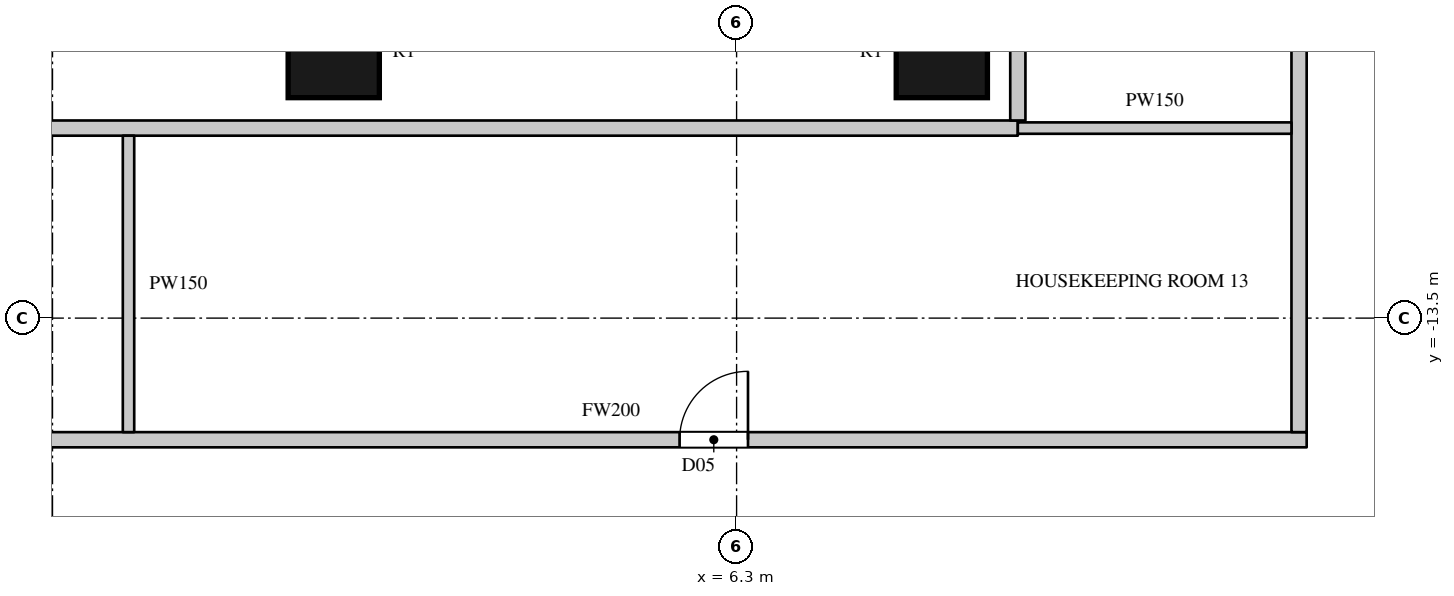
"""IFC4 building model, lengths in metres.
Left out: names, types, materials, properties, quantities, classifications, styles, units other than length and angle.
Written with IfcOpenShell. Run it as: python <this file> out.ifc"""

import sys

from ifc_helpers import new_model, si_unit, direction, frame, frame_2d, origin, origin_2d, place, context, subcontext, project, spatial, rectangle, circle, extrude, element, fill, save


model = new_model("IFC4")
c1 = context("Model", 3, precision=1e-05, world=origin(), true_north=direction((0.0, 1.0)))
c2 = subcontext(c1, "Body", "Model", "MODEL_VIEW")
j1 = project(units=[si_unit("LENGTHUNIT", "METRE"), si_unit("PLANEANGLEUNIT", "RADIAN")], contexts=[c1])
p1 = place(None, origin())
s1 = spatial("IfcSite", under=j1, at=p1, CompositionType="ELEMENT")
p2 = place(p1, origin())
s2 = spatial("IfcBuilding", under=s1, at=p2, CompositionType="ELEMENT")
p3 = place(p2, frame((0.0, 0.0, 77.1)))
s3 = spatial("IfcBuildingStorey", under=s2, at=p3, CompositionType="ELEMENT", Elevation=77.1)
for number, where, z_axis, x_axis in (
    (1, (1.0, -10.0, 0.0), (0.0, 0.0, 1.0), (1.0, 0.0, 0.0)),
    (2, (9.0, -10.0, 0.0), (0.0, 0.0, 1.0), (1.0, 0.0, 0.0)),
):
    element("IfcColumn", number, at=place(p3, frame(where, z_axis=z_axis, x_axis=x_axis)), inside=s3, PredefinedType="COLUMN", context=c2, shape_type="SweptSolid", body=[
        extrude(circle(Radius=0.6, at=origin_2d()), origin(), (0.0, 0.0, 1.0), 3.6),
    ])
p4 = place(p3, frame((-8.1, -11.0, 0.0), z_axis=(0.0, 0.0, 1.0), x_axis=(1.0, 0.0, 0.0)))
e3 = element("IfcWall", 3, at=p4, inside=s3, PredefinedType="PARTITIONING", context=c2, shape_type="SweptSolid", body=[
    extrude(rectangle(XDim=18.1, YDim=0.2, at=frame_2d((9.05, 0.0))), origin(), (0.0, 0.0, 1.0), 3.3),
])
p5 = place(p4, frame((1.7, 0.0, 0.0)))
e4 = element("IfcOpeningElement", 4, at=p5, cuts=e3, PredefinedType="OPENING", context=c2, shape_type="SweptSolid", body=[
    extrude(rectangle(XDim=1.5, YDim=2.2, at=frame_2d((0.75, 1.1))), frame((0.0, 0.11, 0.0), z_axis=(0.0, -1.0, 0.0), x_axis=(1.0, 0.0, 0.0)), (0.0, 0.0, 1.0), 0.22),
])
p6 = place(p3, frame((-4.5, -15.1, 0.0), z_axis=(0.0, 0.0, 1.0), x_axis=(1.0, 0.0, 0.0)))
e5 = element("IfcWall", 5, at=p6, inside=s3, PredefinedType="PARTITIONING", context=c2, shape_type="SweptSolid", body=[
    extrude(rectangle(XDim=18.3, YDim=0.2, at=frame_2d((9.15, 0.0))), origin(), (0.0, 0.0, 1.0), 3.3),
])
p7 = place(p6, frame((10.05, 0.0, 0.0)))
e6 = element("IfcOpeningElement", 6, at=p7, cuts=e5, PredefinedType="OPENING", context=c2, shape_type="SweptSolid", body=[
    extrude(rectangle(XDim=0.9, YDim=2.2, at=frame_2d((0.45, 1.1))), frame((0.0, 0.11, 0.0), z_axis=(0.0, -1.0, 0.0), x_axis=(1.0, 0.0, 0.0)), (0.0, 0.0, 1.0), 0.22),
])
p8 = place(p3, frame((10.0, -10.9, 0.0), z_axis=(0.0, 0.0, 1.0), x_axis=(0.0, 1.0, 0.0)))
e7 = element("IfcWall", 7, at=p8, inside=s3, PredefinedType="PARTITIONING", context=c2, shape_type="SweptSolid", body=[
    extrude(rectangle(XDim=21.8, YDim=0.2, at=frame_2d((10.9, 0.0))), origin(), (0.0, 0.0, 1.0), 3.3),
])
p9 = place(p8, frame((15.9, 0.0, 0.0)))
e8 = element("IfcOpeningElement", 8, at=p9, cuts=e7, PredefinedType="OPENING", context=c2, shape_type="SweptSolid", body=[
    extrude(rectangle(XDim=1.5, YDim=2.2, at=frame_2d((0.75, 1.1))), frame((0.0, 0.11, 0.0), z_axis=(0.0, -1.0, 0.0), x_axis=(1.0, 0.0, 0.0)), (0.0, 0.0, 1.0), 0.22),
])
p10 = place(p8, frame((8.75, 0.0, 0.0)))
e9 = element("IfcOpeningElement", 9, at=p10, cuts=e7, PredefinedType="OPENING", context=c2, shape_type="SweptSolid", body=[
    extrude(rectangle(XDim=1.5, YDim=2.2, at=frame_2d((0.75, 1.1))), frame((0.0, 0.11, 0.0), z_axis=(0.0, -1.0, 0.0), x_axis=(1.0, 0.0, 0.0)), (0.0, 0.0, 1.0), 0.22),
])
p11 = place(p3, frame((13.7, -15.0, 0.0), z_axis=(0.0, 0.0, 1.0), x_axis=(0.0, 1.0, 0.0)))
e10 = element("IfcWall", 10, at=p11, inside=s3, PredefinedType="PARTITIONING", context=c2, shape_type="SweptSolid", body=[
    extrude(rectangle(XDim=7.2, YDim=0.2, at=frame_2d((3.6, 0.0))), origin(), (0.0, 0.0, 1.0), 3.3),
])
p12 = place(p3, frame((-1.7, -15.0, 0.0), z_axis=(0.0, 0.0, 1.0), x_axis=(0.0, 1.0, 0.0)))
e11 = element("IfcWall", 11, at=p12, inside=s3, PredefinedType="PARTITIONING", context=c2, shape_type="SweptSolid", body=[
    extrude(rectangle(XDim=3.9, YDim=0.15, at=frame_2d((1.95, 0.0))), origin(), (0.0, 0.0, 1.0), 3.3),
])
p13 = place(p3, frame((10.0, -11.0, 0.0), z_axis=(0.0, 0.0, 1.0), x_axis=(1.0, 0.0, 0.0)))
e12 = element("IfcWall", 12, at=p13, inside=s3, PredefinedType="PARTITIONING", context=c2, shape_type="SweptSolid", body=[
    extrude(rectangle(XDim=3.6, YDim=0.15, at=frame_2d((1.8, 0.0))), origin(), (0.0, 0.0, 1.0), 3.3),
])
p14 = place(p7, origin())
e13 = element("IfcDoor", 13, at=p14, inside=s3, OperationType="SINGLE_SWING_RIGHT", PredefinedType="DOOR", context=c2, shape_type="SweptSolid", body=[
    extrude(rectangle(XDim=0.9, YDim=2.2, at=frame_2d((0.45, 1.1))), frame((0.0, 0.025, 0.0), z_axis=(0.0, -1.0, 0.0), x_axis=(1.0, 0.0, 0.0)), (0.0, 0.0, 1.0), 0.05),
])
fill(e6, e13)
save(model, sys.argv[1])
